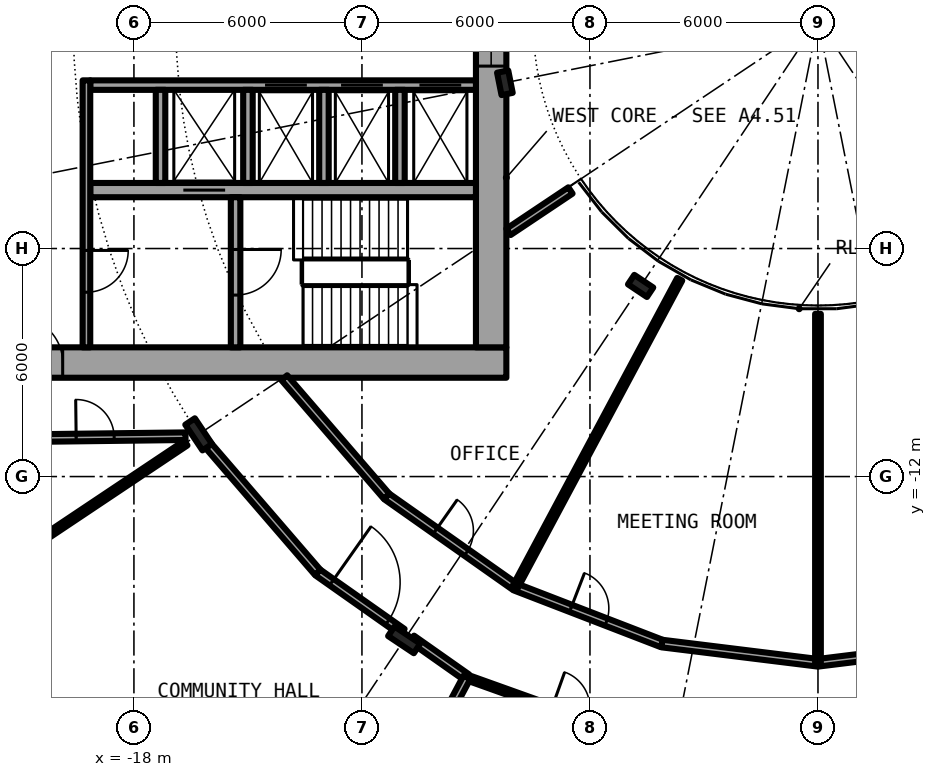
"""IFC4 building model, lengths in metres.
Left out: names, types, materials, properties, quantities, classifications, styles, units other than length and angle.
Written with IfcOpenShell. Run it as: python <this file> out.ifc"""

import sys

from ifc_helpers import new_model, si_unit, direction, frame, frame_2d, origin, origin_2d, place, context, subcontext, project, spatial, rectangle, i_section, extrude, element, fill, save


model = new_model("IFC4")
c1 = context("Model", 3, precision=1e-05, world=origin(), true_north=direction((0.0, 1.0)))
c2 = subcontext(c1, "Body", "Model", "MODEL_VIEW")
j1 = project(units=[si_unit("LENGTHUNIT", "METRE"), si_unit("PLANEANGLEUNIT", "RADIAN")], contexts=[c1])
p1 = place(None, origin())
s1 = spatial("IfcSite", under=j1, at=p1, CompositionType="ELEMENT")
p2 = place(p1, origin())
s2 = spatial("IfcBuilding", under=s1, at=p2, CompositionType="ELEMENT")
p3 = place(p2, frame((0.0, 0.0, 9.6)))
s3 = spatial("IfcBuildingStorey", under=s2, at=p3, CompositionType="ELEMENT", Elevation=9.6)
for number, where, z_axis, x_axis in (
    (1, (-16.297, -10.889, 0.0), (0.0, 0.0, 1.0), (-0.831, -0.556, 0.0)),
    (2, (-10.889, -16.297, 0.0), (0.0, 0.0, 1.0), (-0.556, -0.831, 0.0)),
):
    element("IfcColumn", number, at=place(p3, frame(where, z_axis=z_axis, x_axis=x_axis)), inside=s3, PredefinedType="COLUMN", context=c2, shape_type="SweptSolid", body=[
        extrude(i_section(OverallWidth=0.303, OverallDepth=0.814, WebThickness=0.021, FlangeThickness=0.04, FilletRadius=0.03, at=origin_2d()), origin(), (0.0, 0.0, 1.0), 4.5),
    ])
for number, where, z_axis, x_axis in (
    (3, (-8.239, -1.639, 0.0), (0.0, 0.0, 1.0), (-0.981, -0.195, 0.0)),
    (4, (-4.667, -6.984, 0.0), (0.0, 0.0, 1.0), (-0.556, -0.831, 0.0)),
):
    element("IfcColumn", number, at=place(p3, frame(where, z_axis=z_axis, x_axis=x_axis)), inside=s3, PredefinedType="COLUMN", context=c2, shape_type="SweptSolid", body=[
        extrude(i_section(OverallWidth=0.3, OverallDepth=0.6, WebThickness=0.015, FlangeThickness=0.03, FilletRadius=0.027, at=origin_2d()), origin(), (0.0, 0.0, 1.0), 4.5),
    ])
p4 = place(p3, frame((-22.4, -9.0, 0.0), z_axis=(0.0, 0.0, 1.0), x_axis=(1.0, 0.0, 0.0)))
e5 = element("IfcWall", 5, at=p4, inside=s3, PredefinedType="SHEAR", context=c2, shape_type="SweptSolid", body=[
    extrude(rectangle(XDim=14.2, YDim=0.8, at=frame_2d((7.1, 0.0))), origin(), (0.0, 0.0, 1.0), 4.5),
])
p5 = place(p4, frame((1.325, 0.0, 0.0)))
e6 = element("IfcOpeningElement", 6, at=p5, cuts=e5, PredefinedType="OPENING", context=c2, shape_type="SweptSolid", body=[
    extrude(rectangle(XDim=1.2, YDim=2.3, at=frame_2d((0.6, 1.15))), frame((0.0, 0.41, 0.0), z_axis=(0.0, -1.0, 0.0), x_axis=(1.0, 0.0, 0.0)), (0.0, 0.0, 1.0), 0.82),
])
p6 = place(p3, frame((-8.6, 8.6, 0.0), z_axis=(0.0, 0.0, 1.0), x_axis=(0.0, -1.0, 0.0)))
e7 = element("IfcWall", 7, at=p6, inside=s3, PredefinedType="SHEAR", context=c2, shape_type="SweptSolid", body=[
    extrude(rectangle(XDim=17.2, YDim=0.8, at=frame_2d((8.6, 0.0))), origin(), (0.0, 0.0, 1.0), 4.5),
])
p7 = place(p6, frame((7.4, 0.0, 0.1)))
e8 = element("IfcOpeningElement", 8, at=p7, cuts=e7, PredefinedType="OPENING", context=c2, shape_type="SweptSolid", body=[
    extrude(rectangle(XDim=2.4, YDim=2.2, at=frame_2d((1.2, 1.1))), frame((0.0, 0.41, 0.0), z_axis=(0.0, -1.0, 0.0), x_axis=(1.0, 0.0, 0.0)), (0.0, 0.0, 1.0), 0.82),
])
p8 = place(p3, frame((-9.0, -1.7, 0.0), z_axis=(0.0, 0.0, 1.0), x_axis=(-1.0, 0.0, 0.0)))
e9 = element("IfcWall", 9, at=p8, inside=s3, PredefinedType="SHEAR", context=c2, shape_type="SweptSolid", body=[
    extrude(rectangle(XDim=10.15, YDim=0.25, at=frame_2d((5.075, 0.0))), origin(), (0.0, 0.0, 1.0), 4.5),
])
p9 = place(p8, frame((0.387, 0.0, 0.0)))
e10 = element("IfcOpeningElement", 10, at=p9, cuts=e9, PredefinedType="OPENING", context=c2, shape_type="SweptSolid", body=[
    extrude(rectangle(XDim=1.1, YDim=2.3, at=frame_2d((0.55, 1.15))), frame((0.0, 0.135, 0.0), z_axis=(0.0, -1.0, 0.0), x_axis=(1.0, 0.0, 0.0)), (0.0, 0.0, 1.0), 0.27),
])
p10 = place(p8, frame((2.45, 0.0, 0.0)))
e11 = element("IfcOpeningElement", 11, at=p10, cuts=e9, PredefinedType="OPENING", context=c2, shape_type="SweptSolid", body=[
    extrude(rectangle(XDim=1.1, YDim=2.3, at=frame_2d((0.55, 1.15))), frame((0.0, 0.135, 0.0), z_axis=(0.0, -1.0, 0.0), x_axis=(1.0, 0.0, 0.0)), (0.0, 0.0, 1.0), 0.27),
])
p11 = place(p8, frame((4.45, 0.0, 0.0)))
e12 = element("IfcOpeningElement", 12, at=p11, cuts=e9, PredefinedType="OPENING", context=c2, shape_type="SweptSolid", body=[
    extrude(rectangle(XDim=1.1, YDim=2.3, at=frame_2d((0.55, 1.15))), frame((0.0, 0.135, 0.0), z_axis=(0.0, -1.0, 0.0), x_axis=(1.0, 0.0, 0.0)), (0.0, 0.0, 1.0), 0.27),
])
p12 = place(p3, frame((-9.0, -4.462, 0.0), z_axis=(0.0, 0.0, 1.0), x_axis=(-1.0, 0.0, 0.0)))
e13 = element("IfcWall", 13, at=p12, inside=s3, PredefinedType="SHEAR", context=c2, shape_type="SweptSolid", body=[
    extrude(rectangle(XDim=10.15, YDim=0.375, at=frame_2d((5.075, 0.0))), origin(), (0.0, 0.0, 1.0), 4.5),
])
p13 = place(p12, frame((6.6, 0.0, 0.0)))
e14 = element("IfcOpeningElement", 14, at=p13, cuts=e13, PredefinedType="OPENING", context=c2, shape_type="SweptSolid", body=[
    extrude(rectangle(XDim=1.1, YDim=2.3, at=frame_2d((0.55, 1.15))), frame((0.0, 0.198, 0.0), z_axis=(0.0, -1.0, 0.0), x_axis=(1.0, 0.0, 0.0)), (0.0, 0.0, 1.0), 0.395),
])
p14 = place(p3, frame((-15.325, -4.65, 0.0), z_axis=(0.0, 0.0, 1.0), x_axis=(0.0, -1.0, 0.0)))
e15 = element("IfcWall", 15, at=p14, inside=s3, PredefinedType="SHEAR", context=c2, shape_type="SweptSolid", body=[
    extrude(rectangle(XDim=3.95, YDim=0.25, at=frame_2d((1.975, 0.0))), origin(), (0.0, 0.0, 1.0), 4.5),
])
p15 = place(p14, frame((1.375, 0.0, 0.0)))
e16 = element("IfcOpeningElement", 16, at=p15, cuts=e15, PredefinedType="OPENING", context=c2, shape_type="SweptSolid", body=[
    extrude(rectangle(XDim=1.2, YDim=2.3, at=frame_2d((0.6, 1.15))), frame((0.0, 0.135, 0.0), z_axis=(0.0, -1.0, 0.0), x_axis=(1.0, 0.0, 0.0)), (0.0, 0.0, 1.0), 0.27),
])
for number, where, z_axis, x_axis in (
    (17, (-15.0, -1.825, 0.0), (0.0, 0.0, 1.0), (0.0, -1.0, 0.0)),
    (18, (-17.3, -1.825, 0.0), (0.0, 0.0, 1.0), (0.0, -1.0, 0.0)),
):
    element("IfcWall", number, at=place(p3, frame(where, z_axis=z_axis, x_axis=x_axis)), inside=s3, PredefinedType="SOLIDWALL", context=c2, shape_type="SweptSolid", body=[
        extrude(rectangle(XDim=2.45, YDim=0.25, at=frame_2d((1.225, 0.0))), origin(), (0.0, 0.0, 1.0), 4.05),
    ])
p16 = place(p3, frame((-19.25, -1.575, 0.0), z_axis=(0.0, 0.0, 1.0), x_axis=(0.0, -1.0, 0.0)))
e19 = element("IfcWall", 19, at=p16, inside=s3, PredefinedType="SOLIDWALL", context=c2, shape_type="SweptSolid", body=[
    extrude(rectangle(XDim=7.025, YDim=0.2, at=frame_2d((3.513, 0.0))), origin(), (0.0, 0.0, 1.0), 4.05),
])
p17 = place(p16, frame((4.475, 0.0, 0.0)))
e20 = element("IfcOpeningElement", 20, at=p17, cuts=e19, PredefinedType="OPENING", context=c2, shape_type="SweptSolid", body=[
    extrude(rectangle(XDim=1.1, YDim=2.3, at=frame_2d((0.55, 1.15))), frame((0.0, 0.11, 0.0), z_axis=(0.0, -1.0, 0.0), x_axis=(1.0, 0.0, 0.0)), (0.0, 0.0, 1.0), 0.22),
])
for number, where, z_axis, x_axis in (
    (21, (-11.0, -1.825, 0.0), (0.0, 0.0, 1.0), (0.0, -1.0, 0.0)),
    (22, (-13.0, -1.825, 0.0), (0.0, 0.0, 1.0), (0.0, -1.0, 0.0)),
):
    element("IfcWall", number, at=place(p3, frame(where, z_axis=z_axis, x_axis=x_axis)), inside=s3, PredefinedType="SOLIDWALL", context=c2, shape_type="SweptSolid", body=[
        extrude(rectangle(XDim=2.45, YDim=0.25, at=frame_2d((1.225, 0.0))), origin(), (0.0, 0.0, 1.0), 4.05),
    ])
p18 = place(p3, frame((-16.197, -11.005, 0.0), z_axis=(0.0, 0.0, 1.0), x_axis=(0.653077876854, -0.757290754443, 0.0)))
e23 = element("IfcWall", 23, at=p18, inside=s3, PredefinedType="PARTITIONING", context=c2, shape_type="SweptSolid", body=[
    extrude(rectangle(XDim=4.646, YDim=0.2, at=frame_2d((2.323, 0.0))), origin(), (0.0, 0.0, 1.0), 3.63),
])
p19 = place(p3, frame((-13.163, -14.523, 0.0), z_axis=(0.0, 0.0, 1.0), x_axis=(0.817595540973, -0.575792958781, 0.0)))
e24 = element("IfcWall", 24, at=p19, inside=s3, PredefinedType="PARTITIONING", context=c2, shape_type="SweptSolid", body=[
    extrude(rectangle(XDim=2.725, YDim=0.2, at=frame_2d((1.363, 0.0))), origin(), (0.0, 0.0, 1.0), 3.63),
])
p20 = place(p19, frame((0.45, 0.0, 0.0)))
e25 = element("IfcOpeningElement", 25, at=p20, cuts=e24, PredefinedType="OPENING", context=c2, shape_type="SweptSolid", body=[
    extrude(rectangle(XDim=1.8, YDim=2.3, at=frame_2d((0.9, 1.15))), frame((0.0, 0.11, 0.0), z_axis=(0.0, -1.0, 0.0), x_axis=(1.0, 0.0, 0.0)), (0.0, 0.0, 1.0), 0.22),
])
p21 = place(p3, frame((-10.687, -16.267, 0.0), z_axis=(0.0, 0.0, 1.0), x_axis=(0.817849682833, -0.575431921508, 0.0)))
e26 = element("IfcWall", 26, at=p21, inside=s3, PredefinedType="PARTITIONING", context=c2, shape_type="SweptSolid", body=[
    extrude(rectangle(XDim=1.771, YDim=0.2, at=frame_2d((0.885, 0.0))), origin(), (0.0, 0.0, 1.0), 3.63),
])
p22 = place(p3, frame((-9.239, -17.286, 0.0), z_axis=(0.0, 0.0, 1.0), x_axis=(0.941530584678, -0.336927526504, 0.0)))
e27 = element("IfcWall", 27, at=p22, inside=s3, PredefinedType="PARTITIONING", context=c2, shape_type="SweptSolid", body=[
    extrude(rectangle(XDim=5.598, YDim=0.15, at=frame_2d((2.799, 0.0))), origin(), (0.0, 0.0, 1.0), 3.63),
])
p23 = place(p22, frame((2.376, 0.0, 0.0)))
e28 = element("IfcOpeningElement", 28, at=p23, cuts=e27, PredefinedType="OPENING", context=c2, shape_type="SweptSolid", body=[
    extrude(rectangle(XDim=1.0, YDim=2.3, at=frame_2d((0.5, 1.15))), frame((0.0, 0.085, 0.0), z_axis=(0.0, -1.0, 0.0), x_axis=(1.0, 0.0, 0.0)), (0.0, 0.0, 1.0), 0.17),
])
p24 = place(p3, frame((-14.043, -9.4, 0.0), z_axis=(0.0, 0.0, 1.0), x_axis=(0.653274518104, -0.757121129012, 0.0)))
e29 = element("IfcWall", 29, at=p24, inside=s3, PredefinedType="PARTITIONING", context=c2, shape_type="SweptSolid", body=[
    extrude(rectangle(XDim=4.124, YDim=0.2, at=frame_2d((2.062, 0.0))), origin(), (0.0, 0.0, 1.0), 4.05),
])
p25 = place(p3, frame((-11.349, -12.522, 0.0), z_axis=(0.0, 0.0, 1.0), x_axis=(0.817567680547, -0.575832517079, 0.0)))
e30 = element("IfcWall", 30, at=p25, inside=s3, PredefinedType="PARTITIONING", context=c2, shape_type="SweptSolid", body=[
    extrude(rectangle(XDim=4.137, YDim=0.2, at=frame_2d((2.068, 0.0))), origin(), (0.0, 0.0, 1.0), 4.05),
])
p26 = place(p25, frame((1.568, 0.0, 0.0)))
e31 = element("IfcOpeningElement", 31, at=p26, cuts=e30, PredefinedType="OPENING", context=c2, shape_type="SweptSolid", body=[
    extrude(rectangle(XDim=1.0, YDim=2.3, at=frame_2d((0.5, 1.15))), frame((0.0, 0.11, 0.0), z_axis=(0.0, -1.0, 0.0), x_axis=(1.0, 0.0, 0.0)), (0.0, 0.0, 1.0), 0.22),
])
p27 = place(p3, frame((-7.967, -14.904, 0.0), z_axis=(0.0, 0.0, 1.0), x_axis=(0.932943640288, -0.360022449363, 0.0)))
e32 = element("IfcWall", 32, at=p27, inside=s3, PredefinedType="PARTITIONING", context=c2, shape_type="SweptSolid", body=[
    extrude(rectangle(XDim=4.139, YDim=0.2, at=frame_2d((2.069, 0.0))), origin(), (0.0, 0.0, 1.0), 4.05),
])
p28 = place(p27, frame((1.569, 0.0, 0.0)))
e33 = element("IfcOpeningElement", 33, at=p28, cuts=e32, PredefinedType="OPENING", context=c2, shape_type="SweptSolid", body=[
    extrude(rectangle(XDim=1.0, YDim=2.3, at=frame_2d((0.5, 1.15))), frame((0.0, 0.11, 0.0), z_axis=(0.0, -1.0, 0.0), x_axis=(1.0, 0.0, 0.0)), (0.0, 0.0, 1.0), 0.22),
])
for number, where, z_axis, x_axis in (
    (34, (-4.106, -16.394, 0.0), (0.0, 0.0, 1.0), (0.992, -0.122, 0.0)),
    (35, (0.0, -16.9, 0.0), (0.0, 0.0, 1.0), (0.992, 0.122, 0.0)),
):
    element("IfcWall", number, at=place(p3, frame(where, z_axis=z_axis, x_axis=x_axis)), inside=s3, PredefinedType="PARTITIONING", context=c2, shape_type="SweptSolid", body=[
        extrude(rectangle(XDim=4.137, YDim=0.2, at=frame_2d((2.068, 0.0))), origin(), (0.0, 0.0, 1.0), 4.05),
    ])
p29 = place(p3, frame((-21.675, -11.0, 0.0), z_axis=(0.0, 0.0, 1.0), x_axis=(0.999924074118, 0.012322580895, 0.0)))
e36 = element("IfcWall", 36, at=p29, inside=s3, PredefinedType="PARTITIONING", context=c2, shape_type="SweptSolid", body=[
    extrude(rectangle(XDim=5.032, YDim=0.2, at=frame_2d((2.516, 0.0))), origin(), (0.0, 0.0, 1.0), 4.05),
])
p30 = place(p29, frame((2.155, 0.0, 0.0)))
e37 = element("IfcOpeningElement", 37, at=p30, cuts=e36, PredefinedType="OPENING", context=c2, shape_type="SweptSolid", body=[
    extrude(rectangle(XDim=1.0, YDim=2.3, at=frame_2d((0.5, 1.15))), frame((0.0, 0.11, 0.0), z_axis=(0.0, -1.0, 0.0), x_axis=(1.0, 0.0, 0.0)), (0.0, 0.0, 1.0), 0.22),
])
p31 = place(p3, frame((-6.513, -4.472, 0.0), z_axis=(0.0, 0.0, 1.0), x_axis=(-0.831417956244, -0.555647533996, 0.0)))
e38 = element("IfcWall", 38, at=p31, inside=s3, PredefinedType="PARTITIONING", context=c2, shape_type="SweptSolid", body=[
    extrude(rectangle(XDim=1.962, YDim=0.2, at=frame_2d((0.981, 0.0))), origin(), (0.0, 0.0, 1.0), 4.05),
])
p32 = place(p3, frame((-22.593, -15.101, 0.0), z_axis=(0.0, 0.0, 1.0), x_axis=(0.831415754305, 0.555650828752, 0.0)))
e39 = element("IfcWall", 39, at=p32, inside=s3, PredefinedType="PARTITIONING", context=c2, shape_type="SweptSolid", body=[
    extrude(rectangle(XDim=7.168, YDim=0.15, at=frame_2d((3.584, 0.0))), origin(), (0.0, 0.0, 1.0), 4.05),
])
p33 = place(p3, frame((-10.37, -19.402, 0.0), z_axis=(0.0, 0.0, 1.0), x_axis=(0.471385457832, 0.881927293004, 0.0)))
e40 = element("IfcWall", 40, at=p33, inside=s3, PredefinedType="PARTITIONING", context=c2, shape_type="SweptSolid", body=[
    extrude(rectangle(XDim=2.399, YDim=0.2, at=frame_2d((1.2, 0.0))), origin(), (0.0, 0.0, 1.0), 4.05),
])
p34 = place(p3, frame((-7.966, -14.905, 0.0), z_axis=(0.0, 0.0, 1.0), x_axis=(0.471460365694, 0.881887251059, 0.0)))
e41 = element("IfcWall", 41, at=p34, inside=s3, PredefinedType="PARTITIONING", context=c2, shape_type="SweptSolid", body=[
    extrude(rectangle(XDim=9.18, YDim=0.15, at=frame_2d((4.59, 0.0))), origin(), (0.0, 0.0, 1.0), 4.05),
])
p35 = place(p3, frame((0.0, -16.9, 0.0), z_axis=(0.0, 0.0, 1.0), x_axis=(0.0, 1.0, 0.0)))
e42 = element("IfcWall", 42, at=p35, inside=s3, PredefinedType="PARTITIONING", context=c2, shape_type="SweptSolid", body=[
    extrude(rectangle(XDim=9.18, YDim=0.15, at=frame_2d((4.59, 0.0))), origin(), (0.0, 0.0, 1.0), 4.05),
])
p36 = place(p9, origin())
e43 = element("IfcDoor", 43, at=p36, inside=s3, OperationType="DOUBLE_DOOR_SLIDING", PredefinedType="DOOR", context=c2, shape_type="SweptSolid", body=[
    extrude(rectangle(XDim=1.1, YDim=2.3, at=frame_2d((0.55, 1.15))), frame((0.0, 0.025, 0.0), z_axis=(0.0, -1.0, 0.0), x_axis=(1.0, 0.0, 0.0)), (0.0, 0.0, 1.0), 0.05),
])
fill(e10, e43)
p37 = place(p10, origin())
e44 = element("IfcDoor", 44, at=p37, inside=s3, OperationType="DOUBLE_DOOR_SLIDING", PredefinedType="DOOR", context=c2, shape_type="SweptSolid", body=[
    extrude(rectangle(XDim=1.1, YDim=2.3, at=frame_2d((0.55, 1.15))), frame((0.0, 0.025, 0.0), z_axis=(0.0, -1.0, 0.0), x_axis=(1.0, 0.0, 0.0)), (0.0, 0.0, 1.0), 0.05),
])
fill(e11, e44)
p38 = place(p11, origin())
e45 = element("IfcDoor", 45, at=p38, inside=s3, OperationType="DOUBLE_DOOR_SLIDING", PredefinedType="DOOR", context=c2, shape_type="SweptSolid", body=[
    extrude(rectangle(XDim=1.1, YDim=2.3, at=frame_2d((0.55, 1.15))), frame((0.0, 0.025, 0.0), z_axis=(0.0, -1.0, 0.0), x_axis=(1.0, 0.0, 0.0)), (0.0, 0.0, 1.0), 0.05),
])
fill(e12, e45)
p39 = place(p13, origin())
e46 = element("IfcDoor", 46, at=p39, inside=s3, OperationType="DOUBLE_DOOR_SLIDING", PredefinedType="DOOR", context=c2, shape_type="SweptSolid", body=[
    extrude(rectangle(XDim=1.1, YDim=2.3, at=frame_2d((0.55, 1.15))), frame((0.0, 0.025, 0.0), z_axis=(0.0, -1.0, 0.0), x_axis=(1.0, 0.0, 0.0)), (0.0, 0.0, 1.0), 0.05),
])
fill(e14, e46)
p40 = place(p15, origin())
e47 = element("IfcDoor", 47, at=p40, inside=s3, OperationType="SINGLE_SWING_LEFT", PredefinedType="DOOR", context=c2, shape_type="SweptSolid", body=[
    extrude(rectangle(XDim=1.2, YDim=2.3, at=frame_2d((0.6, 1.15))), frame((0.0, 0.025, 0.0), z_axis=(0.0, -1.0, 0.0), x_axis=(1.0, 0.0, 0.0)), (0.0, 0.0, 1.0), 0.05),
])
fill(e16, e47)
p41 = place(p17, origin())
e48 = element("IfcDoor", 48, at=p41, inside=s3, OperationType="SINGLE_SWING_LEFT", PredefinedType="DOOR", context=c2, shape_type="SweptSolid", body=[
    extrude(rectangle(XDim=1.1, YDim=2.3, at=frame_2d((0.55, 1.15))), frame((0.0, 0.025, 0.0), z_axis=(0.0, -1.0, 0.0), x_axis=(1.0, 0.0, 0.0)), (0.0, 0.0, 1.0), 0.05),
])
fill(e20, e48)
p42 = place(p5, origin())
e49 = element("IfcDoor", 49, at=p42, inside=s3, OperationType="SINGLE_SWING_RIGHT", PredefinedType="DOOR", context=c2, shape_type="SweptSolid", body=[
    extrude(rectangle(XDim=1.2, YDim=2.3, at=frame_2d((0.6, 1.15))), frame((0.0, 0.025, 0.0), z_axis=(0.0, -1.0, 0.0), x_axis=(1.0, 0.0, 0.0)), (0.0, 0.0, 1.0), 0.05),
])
fill(e6, e49)
p43 = place(p7, origin())
e50 = element("IfcWindow", 50, at=p43, inside=s3, PartitioningType="SINGLE_PANEL", PredefinedType="WINDOW", context=c2, shape_type="SweptSolid", body=[
    extrude(rectangle(XDim=2.4, YDim=2.2, at=frame_2d((1.2, 1.1))), frame((0.0, 0.03, 0.0), z_axis=(0.0, -1.0, 0.0), x_axis=(1.0, 0.0, 0.0)), (0.0, 0.0, 1.0), 0.06),
])
fill(e8, e50)
p44 = place(p20, origin())
e51 = element("IfcDoor", 51, at=p44, inside=s3, OperationType="DOUBLE_DOOR_SINGLE_SWING", PredefinedType="DOOR", context=c2, shape_type="SweptSolid", body=[
    extrude(rectangle(XDim=1.8, YDim=2.3, at=frame_2d((0.9, 1.15))), frame((0.0, 0.025, 0.0), z_axis=(0.0, -1.0, 0.0), x_axis=(1.0, 0.0, 0.0)), (0.0, 0.0, 1.0), 0.05),
])
fill(e25, e51)
p45 = place(p26, origin())
e52 = element("IfcDoor", 52, at=p45, inside=s3, OperationType="SINGLE_SWING_RIGHT", PredefinedType="DOOR", context=c2, shape_type="SweptSolid", body=[
    extrude(rectangle(XDim=1.0, YDim=2.3, at=frame_2d((0.5, 1.15))), frame((0.0, 0.025, 0.0), z_axis=(0.0, -1.0, 0.0), x_axis=(1.0, 0.0, 0.0)), (0.0, 0.0, 1.0), 0.05),
])
fill(e31, e52)
p46 = place(p28, origin())
e53 = element("IfcDoor", 53, at=p46, inside=s3, OperationType="SINGLE_SWING_LEFT", PredefinedType="DOOR", context=c2, shape_type="SweptSolid", body=[
    extrude(rectangle(XDim=1.0, YDim=2.3, at=frame_2d((0.5, 1.15))), frame((0.0, 0.025, 0.0), z_axis=(0.0, -1.0, 0.0), x_axis=(1.0, 0.0, 0.0)), (0.0, 0.0, 1.0), 0.05),
])
fill(e33, e53)
p47 = place(p30, origin())
e54 = element("IfcDoor", 54, at=p47, inside=s3, OperationType="SINGLE_SWING_RIGHT", PredefinedType="DOOR", context=c2, shape_type="SweptSolid", body=[
    extrude(rectangle(XDim=1.0, YDim=2.3, at=frame_2d((0.5, 1.15))), frame((0.0, 0.025, 0.0), z_axis=(0.0, -1.0, 0.0), x_axis=(1.0, 0.0, 0.0)), (0.0, 0.0, 1.0), 0.05),
])
fill(e37, e54)
save(model, sys.argv[1])
